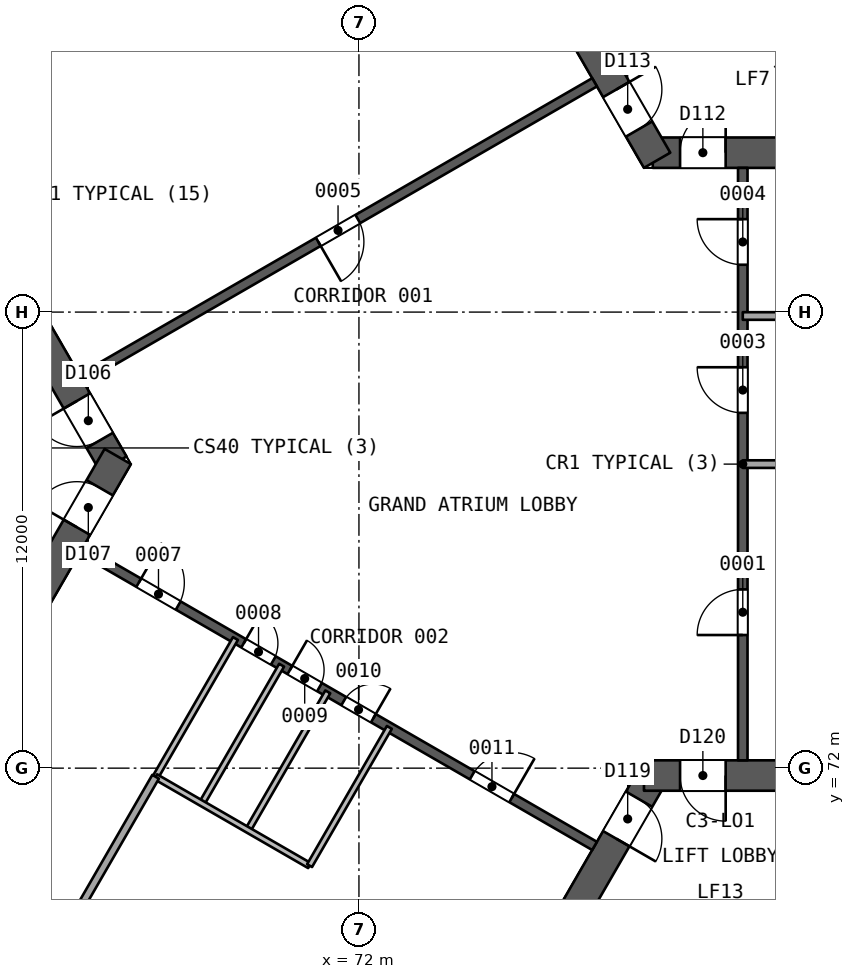
"""IFC4 building model, lengths in metres.
Left out: names, types, materials, properties, quantities, classifications, styles, units other than length and angle.
Written with IfcOpenShell. Run it as: python <this file> out.ifc"""

import sys

from ifc_helpers import new_model, si_unit, direction, frame, frame_2d, origin, place, context, subcontext, project, spatial, rectangle, extrude, element, fill, save


model = new_model("IFC4")
c1 = context("Model", 3, precision=1e-05, world=origin(), true_north=direction((0.0, 1.0)))
c2 = subcontext(c1, "Body", "Model", "MODEL_VIEW")
j1 = project(units=[si_unit("LENGTHUNIT", "METRE"), si_unit("PLANEANGLEUNIT", "RADIAN")], contexts=[c1])
p1 = place(None, origin())
s1 = spatial("IfcSite", under=j1, at=p1, CompositionType="ELEMENT")
p2 = place(p1, origin())
s2 = spatial("IfcBuilding", under=s1, at=p2, CompositionType="ELEMENT")
p3 = place(p2, origin())
s3 = spatial("IfcBuildingStorey", under=s2, at=p3, CompositionType="ELEMENT", Elevation=0.0)
p4 = place(p3, frame((65.538, 80.0, 0.0), z_axis=(0.0, 0.0, 1.0), x_axis=(-0.49999662545, 0.866027352073, 0.0)))
e1 = element("IfcWall", 1, at=p4, inside=s3, PredefinedType="SHEAR", context=c2, shape_type="SweptSolid", body=[
    extrude(rectangle(XDim=10.149, YDim=0.8, at=frame_2d((5.074, 0.0))), origin(), (0.0, 0.0, 1.0), 9.0),
])
p5 = place(p4, frame((0.719, 0.0, 0.0)))
e2 = element("IfcOpeningElement", 2, at=p5, cuts=e1, PredefinedType="OPENING", context=c2, shape_type="SweptSolid", body=[
    extrude(rectangle(XDim=1.2, YDim=2.1, at=frame_2d((0.6, 1.05))), frame((0.0, 0.411, 0.0), z_axis=(0.0, -1.0, 0.0), x_axis=(1.0, 0.0, 0.0)), (0.0, 0.0, 1.0), 0.821),
])
p6 = place(p3, frame((60.664, 71.557, 0.0), z_axis=(0.0, 0.0, 1.0), x_axis=(0.50000409368, 0.866023040284, 0.0)))
e3 = element("IfcWall", 3, at=p6, inside=s3, PredefinedType="SHEAR", context=c2, shape_type="SweptSolid", body=[
    extrude(rectangle(XDim=9.98, YDim=0.8, at=frame_2d((4.99, 0.0))), origin(), (0.0, 0.0, 1.0), 9.0),
])
p7 = place(p6, frame((7.83, 0.0, 0.0)))
e4 = element("IfcOpeningElement", 4, at=p7, cuts=e3, PredefinedType="OPENING", context=c2, shape_type="SweptSolid", body=[
    extrude(rectangle(XDim=1.2, YDim=2.1, at=frame_2d((0.6, 1.05))), frame((0.0, 0.411, 0.0), z_axis=(0.0, -1.0, 0.0), x_axis=(1.0, 0.0, 0.0)), (0.0, 0.0, 1.0), 0.821),
])
p8 = place(p3, frame((79.731, 88.194, 0.0), z_axis=(0.0, 0.0, 1.0), x_axis=(1.0, 0.0, 0.0)))
e5 = element("IfcWall", 5, at=p8, inside=s3, PredefinedType="SHEAR", context=c2, shape_type="SweptSolid", body=[
    extrude(rectangle(XDim=10.149, YDim=0.8, at=frame_2d((5.074, 0.0))), origin(), (0.0, 0.0, 1.0), 9.0),
])
p9 = place(p8, frame((0.719, 0.0, 0.0)))
e6 = element("IfcOpeningElement", 6, at=p9, cuts=e5, PredefinedType="OPENING", context=c2, shape_type="SweptSolid", body=[
    extrude(rectangle(XDim=1.2, YDim=2.1, at=frame_2d((0.6, 1.05))), frame((0.0, 0.411, 0.0), z_axis=(0.0, -1.0, 0.0), x_axis=(1.0, 0.0, 0.0)), (0.0, 0.0, 1.0), 0.821),
])
p10 = place(p3, frame((74.856, 96.637, 0.0), z_axis=(0.0, 0.0, 1.0), x_axis=(0.499993500917, -0.866029155999, 0.0)))
e7 = element("IfcWall", 7, at=p10, inside=s3, PredefinedType="SHEAR", context=c2, shape_type="SweptSolid", body=[
    extrude(rectangle(XDim=9.98, YDim=0.8, at=frame_2d((4.99, 0.0))), origin(), (0.0, 0.0, 1.0), 9.0),
])
p11 = place(p10, frame((7.83, 0.0, 0.0)))
e8 = element("IfcOpeningElement", 8, at=p11, cuts=e7, PredefinedType="OPENING", context=c2, shape_type="SweptSolid", body=[
    extrude(rectangle(XDim=1.2, YDim=2.1, at=frame_2d((0.6, 1.05))), frame((0.0, 0.411, 0.0), z_axis=(0.0, -1.0, 0.0), x_axis=(1.0, 0.0, 0.0)), (0.0, 0.0, 1.0), 0.821),
])
p12 = place(p3, frame((79.731, 71.806, 0.0), z_axis=(0.0, 0.0, 1.0), x_axis=(-0.49999662545, -0.866027352073, 0.0)))
e9 = element("IfcWall", 9, at=p12, inside=s3, PredefinedType="SHEAR", context=c2, shape_type="SweptSolid", body=[
    extrude(rectangle(XDim=10.149, YDim=0.8, at=frame_2d((5.074, 0.0))), origin(), (0.0, 0.0, 1.0), 9.0),
])
p13 = place(p12, frame((0.719, 0.0, 0.0)))
e10 = element("IfcOpeningElement", 10, at=p13, cuts=e9, PredefinedType="OPENING", context=c2, shape_type="SweptSolid", body=[
    extrude(rectangle(XDim=1.2, YDim=2.1, at=frame_2d((0.6, 1.05))), frame((0.0, 0.411, 0.0), z_axis=(0.0, -1.0, 0.0), x_axis=(1.0, 0.0, 0.0)), (0.0, 0.0, 1.0), 0.821),
])
p14 = place(p3, frame((89.48, 71.806, 0.0), z_axis=(0.0, 0.0, 1.0), x_axis=(-1.0, 0.0, 0.0)))
e11 = element("IfcWall", 11, at=p14, inside=s3, PredefinedType="SHEAR", context=c2, shape_type="SweptSolid", body=[
    extrude(rectangle(XDim=9.98, YDim=0.8, at=frame_2d((4.99, 0.0))), origin(), (0.0, 0.0, 1.0), 9.0),
])
p15 = place(p14, frame((7.83, 0.0, 0.0)))
e12 = element("IfcOpeningElement", 12, at=p15, cuts=e11, PredefinedType="OPENING", context=c2, shape_type="SweptSolid", body=[
    extrude(rectangle(XDim=1.2, YDim=2.1, at=frame_2d((0.6, 1.05))), frame((0.0, 0.411, 0.0), z_axis=(0.0, -1.0, 0.0), x_axis=(1.0, 0.0, 0.0)), (0.0, 0.0, 1.0), 0.821),
])
p16 = place(p3, frame((82.1, 72.206, 0.0), z_axis=(0.0, 0.0, 1.0), x_axis=(0.0, 1.0, 0.0)))
e13 = element("IfcWall", 13, at=p16, inside=s3, PredefinedType="SHEAR", context=c2, shape_type="SweptSolid", body=[
    extrude(rectangle(XDim=15.588, YDim=0.25, at=frame_2d((7.794, 0.0))), origin(), (0.0, 0.0, 1.0), 8.6),
])
p17 = place(p16, frame((3.297, 0.0, 0.0)))
e14 = element("IfcOpeningElement", 14, at=p17, cuts=e13, PredefinedType="OPENING", context=c2, shape_type="SweptSolid", body=[
    extrude(rectangle(XDim=1.2, YDim=2.4, at=frame_2d((0.6, 1.2))), frame((0.0, 0.135, 0.0), z_axis=(0.0, -1.0, 0.0), x_axis=(1.0, 0.0, 0.0)), (0.0, 0.0, 1.0), 0.271),
])
p18 = place(p16, frame((9.143, 0.0, 0.0)))
e15 = element("IfcOpeningElement", 15, at=p18, cuts=e13, PredefinedType="OPENING", context=c2, shape_type="SweptSolid", body=[
    extrude(rectangle(XDim=1.2, YDim=2.4, at=frame_2d((0.6, 1.2))), frame((0.0, 0.135, 0.0), z_axis=(0.0, -1.0, 0.0), x_axis=(1.0, 0.0, 0.0)), (0.0, 0.0, 1.0), 0.271),
])
p19 = place(p16, frame((13.04, 0.0, 0.0)))
e16 = element("IfcOpeningElement", 16, at=p19, cuts=e13, PredefinedType="OPENING", context=c2, shape_type="SweptSolid", body=[
    extrude(rectangle(XDim=1.2, YDim=2.4, at=frame_2d((0.6, 1.2))), frame((0.0, 0.135, 0.0), z_axis=(0.0, -1.0, 0.0), x_axis=(1.0, 0.0, 0.0)), (0.0, 0.0, 1.0), 0.271),
])
p20 = place(p3, frame((78.2, 90.046, 0.0), z_axis=(0.0, 0.0, 1.0), x_axis=(-0.866026492143, -0.499998114903, 0.0)))
e17 = element("IfcWall", 17, at=p20, inside=s3, PredefinedType="SHEAR", context=c2, shape_type="SweptSolid", body=[
    extrude(rectangle(XDim=15.588, YDim=0.25, at=frame_2d((7.794, 0.0))), origin(), (0.0, 0.0, 1.0), 8.6),
])
p21 = place(p20, frame((7.194, 0.0, 0.0)))
e18 = element("IfcOpeningElement", 18, at=p21, cuts=e17, PredefinedType="OPENING", context=c2, shape_type="SweptSolid", body=[
    extrude(rectangle(XDim=1.2, YDim=2.4, at=frame_2d((0.6, 1.2))), frame((0.0, 0.135, 0.0), z_axis=(0.0, -1.0, 0.0), x_axis=(1.0, 0.0, 0.0)), (0.0, 0.0, 1.0), 0.271),
])
p22 = place(p3, frame((64.7, 77.748, 0.0), z_axis=(0.0, 0.0, 1.0), x_axis=(0.866026492143, -0.499998114903, 0.0)))
e19 = element("IfcWall", 19, at=p22, inside=s3, PredefinedType="SHEAR", context=c2, shape_type="SweptSolid", body=[
    extrude(rectangle(XDim=15.588, YDim=0.25, at=frame_2d((7.794, 0.0))), origin(), (0.0, 0.0, 1.0), 8.6),
])
p23 = place(p22, frame((1.738, 0.0, 0.0)))
e20 = element("IfcOpeningElement", 20, at=p23, cuts=e19, PredefinedType="OPENING", context=c2, shape_type="SweptSolid", body=[
    extrude(rectangle(XDim=1.2, YDim=2.4, at=frame_2d((0.6, 1.2))), frame((0.0, 0.135, 0.0), z_axis=(0.0, -1.0, 0.0), x_axis=(1.0, 0.0, 0.0)), (0.0, 0.0, 1.0), 0.271),
])
p24 = place(p22, frame((4.928, 0.0, 0.0)))
e21 = element("IfcOpeningElement", 21, at=p24, cuts=e19, PredefinedType="OPENING", context=c2, shape_type="SweptSolid", body=[
    extrude(rectangle(XDim=0.9, YDim=2.1, at=frame_2d((0.45, 1.05))), frame((0.0, 0.135, 0.0), z_axis=(0.0, -1.0, 0.0), x_axis=(1.0, 0.0, 0.0)), (0.0, 0.0, 1.0), 0.271),
])
p25 = place(p22, frame((6.331, 0.0, 0.0)))
e22 = element("IfcOpeningElement", 22, at=p25, cuts=e19, PredefinedType="OPENING", context=c2, shape_type="SweptSolid", body=[
    extrude(rectangle(XDim=0.9, YDim=2.1, at=frame_2d((0.45, 1.05))), frame((0.0, 0.135, 0.0), z_axis=(0.0, -1.0, 0.0), x_axis=(1.0, 0.0, 0.0)), (0.0, 0.0, 1.0), 0.271),
])
p26 = place(p22, frame((7.968, 0.0, 0.0)))
e23 = element("IfcOpeningElement", 23, at=p26, cuts=e19, PredefinedType="OPENING", context=c2, shape_type="SweptSolid", body=[
    extrude(rectangle(XDim=0.9, YDim=2.1, at=frame_2d((0.45, 1.05))), frame((0.0, 0.135, 0.0), z_axis=(0.0, -1.0, 0.0), x_axis=(1.0, 0.0, 0.0)), (0.0, 0.0, 1.0), 0.271),
])
p27 = place(p22, frame((11.871, 0.0, 0.0)))
e24 = element("IfcOpeningElement", 24, at=p27, cuts=e19, PredefinedType="OPENING", context=c2, shape_type="SweptSolid", body=[
    extrude(rectangle(XDim=1.2, YDim=2.4, at=frame_2d((0.6, 1.2))), frame((0.0, 0.135, 0.0), z_axis=(0.0, -1.0, 0.0), x_axis=(1.0, 0.0, 0.0)), (0.0, 0.0, 1.0), 0.271),
])
p28 = place(p3, frame((95.388, 80.0, 0.0), z_axis=(0.0, 0.0, 1.0), x_axis=(-1.0, 0.0, 0.0)))
e25 = element("IfcWall", 25, at=p28, inside=s3, PredefinedType="PARTITIONING", context=c2, shape_type="SweptSolid", body=[
    extrude(rectangle(XDim=13.288, YDim=0.2, at=frame_2d((6.644, 0.0))), origin(), (0.0, 0.0, 1.0), 8.6),
])
p29 = place(p3, frame((103.301, 83.897, 0.0), z_axis=(0.0, 0.0, 1.0), x_axis=(-1.0, 0.0, 0.0)))
e26 = element("IfcWall", 26, at=p29, inside=s3, PredefinedType="PARTITIONING", context=c2, shape_type="SweptSolid", body=[
    extrude(rectangle(XDim=21.201, YDim=0.2, at=frame_2d((10.601, 0.0))), origin(), (0.0, 0.0, 1.0), 8.6),
])
p30 = place(p3, frame((66.65, 71.773, 0.0), z_axis=(0.0, 0.0, 1.0), x_axis=(0.500002543286, 0.866023935413, 0.0)))
e27 = element("IfcWall", 27, at=p30, inside=s3, PredefinedType="PARTITIONING", context=c2, shape_type="SweptSolid", body=[
    extrude(rectangle(XDim=4.2, YDim=0.15, at=frame_2d((2.1, 0.0))), origin(), (0.0, 0.0, 1.0), 8.6),
])
p31 = place(p3, frame((61.449, 62.767, 0.0), z_axis=(0.0, 0.0, 1.0), x_axis=(0.499999493275, 0.866025696342, 0.0)))
e28 = element("IfcWall", 28, at=p31, inside=s3, PredefinedType="PARTITIONING", context=c2, shape_type="SweptSolid", body=[
    extrude(rectangle(XDim=10.4, YDim=0.2, at=frame_2d((5.2, 0.0))), origin(), (0.0, 0.0, 1.0), 8.6),
])
for number, where, z_axis, x_axis in (
    (29, (67.865, 71.071, 0.0), (0.0, 0.0, 1.0), (0.5, 0.866, 0.0)),
    (30, (69.08, 70.37, 0.0), (0.0, 0.0, 1.0), (0.5, 0.866, 0.0)),
):
    element("IfcWall", number, at=place(p3, frame(where, z_axis=z_axis, x_axis=x_axis)), inside=s3, PredefinedType="PARTITIONING", context=c2, shape_type="SweptSolid", body=[
        extrude(rectangle(XDim=4.2, YDim=0.15, at=frame_2d((2.1, 0.0))), origin(), (0.0, 0.0, 1.0), 8.6),
    ])
p32 = place(p3, frame((66.65, 71.774, 0.0), z_axis=(0.0, 0.0, 1.0), x_axis=(0.866017799667, -0.500013170487, 0.0)))
e31 = element("IfcWall", 31, at=p32, inside=s3, PredefinedType="PARTITIONING", context=c2, shape_type="SweptSolid", body=[
    extrude(rectangle(XDim=4.677, YDim=0.15, at=frame_2d((2.338, 0.0))), origin(), (0.0, 0.0, 1.0), 8.6),
])
p33 = place(p3, frame((70.7, 69.435, 0.0), z_axis=(0.0, 0.0, 1.0), x_axis=(0.500016035621, 0.866016145416, 0.0)))
e32 = element("IfcWall", 32, at=p33, inside=s3, PredefinedType="PARTITIONING", context=c2, shape_type="SweptSolid", body=[
    extrude(rectangle(XDim=4.199, YDim=0.15, at=frame_2d((2.1, 0.0))), origin(), (0.0, 0.0, 1.0), 8.6),
])
p34 = place(p3, frame((86.77, 89.486, 0.0), z_axis=(0.0, 0.0, 1.0), x_axis=(-0.86601811187, 0.500012629753, 0.0)))
e33 = element("IfcWall", 33, at=p34, inside=s3, PredefinedType="SOLIDWALL", context=c2, shape_type="SweptSolid", body=[
    extrude(rectangle(XDim=10.9, YDim=0.2, at=frame_2d((5.45, 0.0))), origin(), (0.0, 0.0, 1.0), 8.6),
])
p35 = place(p34, frame((0.575, 0.0, 0.0)))
e34 = element("IfcOpeningElement", 34, at=p35, cuts=e33, PredefinedType="OPENING", context=c2, shape_type="SweptSolid", body=[
    extrude(rectangle(XDim=1.1, YDim=2.1, at=frame_2d((0.55, 1.05))), frame((0.0, 0.11, 0.0), z_axis=(0.0, -1.0, 0.0), x_axis=(1.0, 0.0, 0.0)), (0.0, 0.0, 1.0), 0.221),
])
p36 = place(p34, frame((2.825, 0.0, 0.0)))
e35 = element("IfcOpeningElement", 35, at=p36, cuts=e33, PredefinedType="OPENING", context=c2, shape_type="SweptSolid", body=[
    extrude(rectangle(XDim=1.1, YDim=2.1, at=frame_2d((0.55, 1.05))), frame((0.0, 0.11, 0.0), z_axis=(0.0, -1.0, 0.0), x_axis=(1.0, 0.0, 0.0)), (0.0, 0.0, 1.0), 0.221),
])
p37 = place(p34, frame((5.075, 0.0, 0.0)))
e36 = element("IfcOpeningElement", 36, at=p37, cuts=e33, PredefinedType="OPENING", context=c2, shape_type="SweptSolid", body=[
    extrude(rectangle(XDim=1.1, YDim=2.1, at=frame_2d((0.55, 1.05))), frame((0.0, 0.11, 0.0), z_axis=(0.0, -1.0, 0.0), x_axis=(1.0, 0.0, 0.0)), (0.0, 0.0, 1.0), 0.221),
])
p38 = place(p34, frame((7.325, 0.0, 0.0)))
e37 = element("IfcOpeningElement", 37, at=p38, cuts=e33, PredefinedType="OPENING", context=c2, shape_type="SweptSolid", body=[
    extrude(rectangle(XDim=1.1, YDim=2.1, at=frame_2d((0.55, 1.05))), frame((0.0, 0.11, 0.0), z_axis=(0.0, -1.0, 0.0), x_axis=(1.0, 0.0, 0.0)), (0.0, 0.0, 1.0), 0.221),
])
p39 = place(p3, frame((77.135, 64.952, 0.0), z_axis=(0.0, 0.0, 1.0), x_axis=(0.866031916153, 0.499988720078, 0.0)))
e38 = element("IfcWall", 38, at=p39, inside=s3, PredefinedType="SOLIDWALL", context=c2, shape_type="SweptSolid", body=[
    extrude(rectangle(XDim=11.35, YDim=0.2, at=frame_2d((5.675, 0.0))), origin(), (0.0, 0.0, 1.0), 8.6),
])
p40 = place(p39, frame((0.5, 0.0, 0.0)))
e39 = element("IfcOpeningElement", 39, at=p40, cuts=e38, PredefinedType="OPENING", context=c2, shape_type="SweptSolid", body=[
    extrude(rectangle(XDim=1.3, YDim=2.1, at=frame_2d((0.65, 1.05))), frame((0.0, 0.11, 0.0), z_axis=(0.0, -1.0, 0.0), x_axis=(1.0, 0.0, 0.0)), (0.0, 0.0, 1.0), 0.221),
])
p41 = place(p39, frame((2.875, 0.0, 0.0)))
e40 = element("IfcOpeningElement", 40, at=p41, cuts=e38, PredefinedType="OPENING", context=c2, shape_type="SweptSolid", body=[
    extrude(rectangle(XDim=1.1, YDim=2.1, at=frame_2d((0.55, 1.05))), frame((0.0, 0.11, 0.0), z_axis=(0.0, -1.0, 0.0), x_axis=(1.0, 0.0, 0.0)), (0.0, 0.0, 1.0), 0.221),
])
p42 = place(p39, frame((5.125, 0.0, 0.0)))
e41 = element("IfcOpeningElement", 41, at=p42, cuts=e38, PredefinedType="OPENING", context=c2, shape_type="SweptSolid", body=[
    extrude(rectangle(XDim=1.1, YDim=2.1, at=frame_2d((0.55, 1.05))), frame((0.0, 0.11, 0.0), z_axis=(0.0, -1.0, 0.0), x_axis=(1.0, 0.0, 0.0)), (0.0, 0.0, 1.0), 0.221),
])
p43 = place(p39, frame((7.375, 0.0, 0.0)))
e42 = element("IfcOpeningElement", 42, at=p43, cuts=e38, PredefinedType="OPENING", context=c2, shape_type="SweptSolid", body=[
    extrude(rectangle(XDim=1.1, YDim=2.1, at=frame_2d((0.55, 1.05))), frame((0.0, 0.11, 0.0), z_axis=(0.0, -1.0, 0.0), x_axis=(1.0, 0.0, 0.0)), (0.0, 0.0, 1.0), 0.221),
])
p44 = place(p39, frame((9.55, 0.0, 0.0)))
e43 = element("IfcOpeningElement", 43, at=p44, cuts=e38, PredefinedType="OPENING", context=c2, shape_type="SweptSolid", body=[
    extrude(rectangle(XDim=1.3, YDim=2.1, at=frame_2d((0.65, 1.05))), frame((0.0, 0.11, 0.0), z_axis=(0.0, -1.0, 0.0), x_axis=(1.0, 0.0, 0.0)), (0.0, 0.0, 1.0), 0.221),
])
p45 = place(p17, origin())
e44 = element("IfcDoor", 44, at=p45, inside=s3, OperationType="SINGLE_SWING_LEFT", PredefinedType="NOTDEFINED", context=c2, shape_type="SweptSolid", body=[
    extrude(rectangle(XDim=1.2, YDim=2.4, at=frame_2d((0.6, 1.2))), frame((0.0, 0.025, 0.0), z_axis=(0.0, -1.0, 0.0), x_axis=(1.0, 0.0, 0.0)), (0.0, 0.0, 1.0), 0.05),
])
fill(e14, e44)
p46 = place(p18, origin())
e45 = element("IfcDoor", 45, at=p46, inside=s3, OperationType="SINGLE_SWING_RIGHT", PredefinedType="NOTDEFINED", context=c2, shape_type="SweptSolid", body=[
    extrude(rectangle(XDim=1.2, YDim=2.4, at=frame_2d((0.6, 1.2))), frame((0.0, 0.025, 0.0), z_axis=(0.0, -1.0, 0.0), x_axis=(1.0, 0.0, 0.0)), (0.0, 0.0, 1.0), 0.05),
])
fill(e15, e45)
p47 = place(p19, origin())
e46 = element("IfcDoor", 46, at=p47, inside=s3, OperationType="SINGLE_SWING_RIGHT", PredefinedType="NOTDEFINED", context=c2, shape_type="SweptSolid", body=[
    extrude(rectangle(XDim=1.2, YDim=2.4, at=frame_2d((0.6, 1.2))), frame((0.0, 0.025, 0.0), z_axis=(0.0, -1.0, 0.0), x_axis=(1.0, 0.0, 0.0)), (0.0, 0.0, 1.0), 0.05),
])
fill(e16, e46)
p48 = place(p21, origin())
e47 = element("IfcDoor", 47, at=p48, inside=s3, OperationType="SINGLE_SWING_RIGHT", PredefinedType="NOTDEFINED", context=c2, shape_type="SweptSolid", body=[
    extrude(rectangle(XDim=1.2, YDim=2.4, at=frame_2d((0.6, 1.2))), frame((0.0, 0.025, 0.0), z_axis=(0.0, -1.0, 0.0), x_axis=(1.0, 0.0, 0.0)), (0.0, 0.0, 1.0), 0.05),
])
fill(e18, e47)
p49 = place(p23, origin())
e48 = element("IfcDoor", 48, at=p49, inside=s3, OperationType="SINGLE_SWING_LEFT", PredefinedType="NOTDEFINED", context=c2, shape_type="SweptSolid", body=[
    extrude(rectangle(XDim=1.2, YDim=2.4, at=frame_2d((0.6, 1.2))), frame((0.0, 0.025, 0.0), z_axis=(0.0, -1.0, 0.0), x_axis=(1.0, 0.0, 0.0)), (0.0, 0.0, 1.0), 0.05),
])
fill(e20, e48)
p50 = place(p24, origin())
e49 = element("IfcDoor", 49, at=p50, inside=s3, OperationType="SINGLE_SWING_LEFT", PredefinedType="NOTDEFINED", context=c2, shape_type="SweptSolid", body=[
    extrude(rectangle(XDim=0.9, YDim=2.1, at=frame_2d((0.45, 1.05))), frame((0.0, 0.025, 0.0), z_axis=(0.0, -1.0, 0.0), x_axis=(1.0, 0.0, 0.0)), (0.0, 0.0, 1.0), 0.05),
])
fill(e21, e49)
p51 = place(p25, origin())
e50 = element("IfcDoor", 50, at=p51, inside=s3, OperationType="SINGLE_SWING_LEFT", PredefinedType="NOTDEFINED", context=c2, shape_type="SweptSolid", body=[
    extrude(rectangle(XDim=0.9, YDim=2.1, at=frame_2d((0.45, 1.05))), frame((0.0, 0.025, 0.0), z_axis=(0.0, -1.0, 0.0), x_axis=(1.0, 0.0, 0.0)), (0.0, 0.0, 1.0), 0.05),
])
fill(e22, e50)
p52 = place(p26, origin())
e51 = element("IfcDoor", 51, at=p52, inside=s3, OperationType="SINGLE_SWING_RIGHT", PredefinedType="NOTDEFINED", context=c2, shape_type="SweptSolid", body=[
    extrude(rectangle(XDim=0.9, YDim=2.1, at=frame_2d((0.45, 1.05))), frame((0.0, 0.025, 0.0), z_axis=(0.0, -1.0, 0.0), x_axis=(1.0, 0.0, 0.0)), (0.0, 0.0, 1.0), 0.05),
])
fill(e23, e51)
p53 = place(p27, origin())
e52 = element("IfcDoor", 52, at=p53, inside=s3, OperationType="SINGLE_SWING_RIGHT", PredefinedType="NOTDEFINED", context=c2, shape_type="SweptSolid", body=[
    extrude(rectangle(XDim=1.2, YDim=2.4, at=frame_2d((0.6, 1.2))), frame((0.0, 0.025, 0.0), z_axis=(0.0, -1.0, 0.0), x_axis=(1.0, 0.0, 0.0)), (0.0, 0.0, 1.0), 0.05),
])
fill(e24, e52)
p54 = place(p5, origin())
e53 = element("IfcDoor", 53, at=p54, inside=s3, OperationType="SINGLE_SWING_RIGHT", PredefinedType="NOTDEFINED", context=c2, shape_type="SweptSolid", body=[
    extrude(rectangle(XDim=1.2, YDim=2.1, at=frame_2d((0.6, 1.05))), frame((0.0, 0.025, 0.0), z_axis=(0.0, -1.0, 0.0), x_axis=(1.0, 0.0, 0.0)), (0.0, 0.0, 1.0), 0.05),
])
fill(e2, e53)
p55 = place(p7, origin())
e54 = element("IfcDoor", 54, at=p55, inside=s3, OperationType="SINGLE_SWING_LEFT", PredefinedType="NOTDEFINED", context=c2, shape_type="SweptSolid", body=[
    extrude(rectangle(XDim=1.2, YDim=2.1, at=frame_2d((0.6, 1.05))), frame((0.0, 0.025, 0.0), z_axis=(0.0, -1.0, 0.0), x_axis=(1.0, 0.0, 0.0)), (0.0, 0.0, 1.0), 0.05),
])
fill(e4, e54)
p56 = place(p9, origin())
e55 = element("IfcDoor", 55, at=p56, inside=s3, OperationType="SINGLE_SWING_RIGHT", PredefinedType="NOTDEFINED", context=c2, shape_type="SweptSolid", body=[
    extrude(rectangle(XDim=1.2, YDim=2.1, at=frame_2d((0.6, 1.05))), frame((0.0, 0.025, 0.0), z_axis=(0.0, -1.0, 0.0), x_axis=(1.0, 0.0, 0.0)), (0.0, 0.0, 1.0), 0.05),
])
fill(e6, e55)
p57 = place(p11, origin())
e56 = element("IfcDoor", 56, at=p57, inside=s3, OperationType="SINGLE_SWING_LEFT", PredefinedType="NOTDEFINED", context=c2, shape_type="SweptSolid", body=[
    extrude(rectangle(XDim=1.2, YDim=2.1, at=frame_2d((0.6, 1.05))), frame((0.0, 0.025, 0.0), z_axis=(0.0, -1.0, 0.0), x_axis=(1.0, 0.0, 0.0)), (0.0, 0.0, 1.0), 0.05),
])
fill(e8, e56)
p58 = place(p13, origin())
e57 = element("IfcDoor", 57, at=p58, inside=s3, OperationType="SINGLE_SWING_RIGHT", PredefinedType="NOTDEFINED", context=c2, shape_type="SweptSolid", body=[
    extrude(rectangle(XDim=1.2, YDim=2.1, at=frame_2d((0.6, 1.05))), frame((0.0, 0.025, 0.0), z_axis=(0.0, -1.0, 0.0), x_axis=(1.0, 0.0, 0.0)), (0.0, 0.0, 1.0), 0.05),
])
fill(e10, e57)
p59 = place(p15, origin())
e58 = element("IfcDoor", 58, at=p59, inside=s3, OperationType="SINGLE_SWING_LEFT", PredefinedType="NOTDEFINED", context=c2, shape_type="SweptSolid", body=[
    extrude(rectangle(XDim=1.2, YDim=2.1, at=frame_2d((0.6, 1.05))), frame((0.0, 0.025, 0.0), z_axis=(0.0, -1.0, 0.0), x_axis=(1.0, 0.0, 0.0)), (0.0, 0.0, 1.0), 0.05),
])
fill(e12, e58)
save(model, sys.argv[1])
